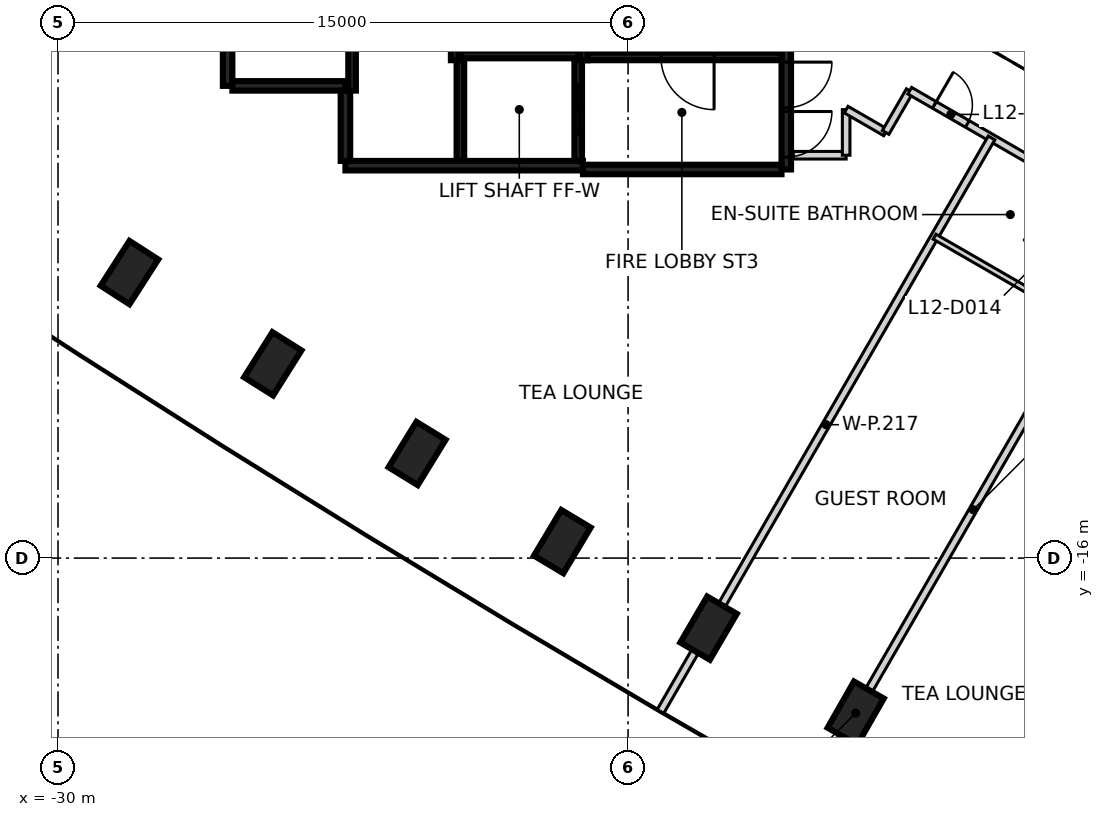
"""IFC4 building model, lengths in metres.
Left out: names, types, materials, properties, quantities, classifications, styles, units other than length and angle.
Written with IfcOpenShell. Run it as: python <this file> out.ifc"""

import sys

from ifc_helpers import new_model, si_unit, direction, frame, frame_2d, origin, origin_2d, place, context, subcontext, project, spatial, rectangle, extrude, element, fill, save


model = new_model("IFC4")
c1 = context("Model", 3, precision=1e-05, world=origin(), true_north=direction((0.0, 1.0)))
c2 = subcontext(c1, "Body", "Model", "MODEL_VIEW")
j1 = project(units=[si_unit("LENGTHUNIT", "METRE"), si_unit("PLANEANGLEUNIT", "RADIAN")], contexts=[c1])
p1 = place(None, origin())
s1 = spatial("IfcSite", under=j1, at=p1, CompositionType="ELEMENT")
p2 = place(p1, origin())
s2 = spatial("IfcBuilding", under=s1, at=p2, CompositionType="ELEMENT")
p3 = place(p2, frame((0.0, 0.0, 56.6)))
s3 = spatial("IfcBuildingStorey", under=s2, at=p3, CompositionType="ELEMENT", Elevation=56.6)
for number, where, z_axis, x_axis in (
    (1, (-28.12, -8.488, -0.475), (0.0, 0.0, 1.0), (0.541, 0.841, 0.0)),
    (2, (-24.349, -10.888, -0.475), (0.0, 0.0, 1.0), (0.532, 0.846, 0.0)),
    (3, (-20.552, -13.248, -0.475), (0.0, 0.0, 1.0), (0.523, 0.852, 0.0)),
    (4, (-16.73, -15.566, -0.475), (0.0, 0.0, 1.0), (0.514, 0.858, 0.0)),
    (5, (-12.883, -17.844, -0.475), (0.0, 0.0, 1.0), (0.505, 0.863, 0.0)),
    (6, (-9.011, -20.079, -0.475), (0.0, 0.0, 1.0), (0.495, 0.869, 0.0)),
):
    element("IfcColumn", number, at=place(p3, frame(where, z_axis=z_axis, x_axis=x_axis)), inside=s3, PredefinedType="COLUMN", context=c2, shape_type="SweptSolid", body=[
        extrude(rectangle(XDim=1.4, YDim=0.9, at=origin_2d()), origin(), (0.0, 0.0, 1.0), 3.6),
    ])
p4 = place(p3, frame((-10.837, 5.775, 0.0), z_axis=(0.0, 0.0, 1.0), x_axis=(0.0, -1.0, 0.0)))
e7 = element("IfcWall", 7, at=p4, inside=s3, PredefinedType="SHEAR", context=c2, shape_type="SweptSolid", body=[
    extrude(rectangle(XDim=11.55, YDim=0.25, at=frame_2d((5.775, 0.0))), origin(), (0.0, 0.0, 1.0), 3.125),
])
p5 = place(p4, frame((10.025, 0.0, 0.0)))
e8 = element("IfcOpeningElement", 8, at=p5, cuts=e7, PredefinedType="OPENING", context=c2, shape_type="SweptSolid", body=[
    extrude(rectangle(XDim=1.2, YDim=2.1, at=frame_2d((0.6, 1.05))), frame((0.0, 0.135, 0.0), z_axis=(0.0, -1.0, 0.0), x_axis=(1.0, 0.0, 0.0)), (0.0, 0.0, 1.0), 0.27),
])
p6 = place(p4, frame((8.725, 0.0, 0.0)))
e9 = element("IfcOpeningElement", 9, at=p6, cuts=e7, PredefinedType="OPENING", context=c2, shape_type="SweptSolid", body=[
    extrude(rectangle(XDim=1.2, YDim=2.1, at=frame_2d((0.6, 1.05))), frame((0.0, 0.135, 0.0), z_axis=(0.0, -1.0, 0.0), x_axis=(1.0, 0.0, 0.0)), (0.0, 0.0, 1.0), 0.27),
])
p7 = place(p3, frame((-16.187, -5.675, 0.0), z_axis=(0.0, 0.0, 1.0), x_axis=(-1.0, 0.0, 0.0)))
e10 = element("IfcWall", 10, at=p7, inside=s3, PredefinedType="SHEAR", context=c2, shape_type="SweptSolid", body=[
    extrude(rectangle(XDim=6.25, YDim=0.25, at=frame_2d((3.125, 0.0))), origin(), (0.0, 0.0, 1.0), 3.125),
])
p8 = place(p3, frame((-25.537, -3.575, 0.0), z_axis=(0.0, 0.0, 1.0), x_axis=(0.0, 1.0, 0.0)))
e11 = element("IfcWall", 11, at=p8, inside=s3, PredefinedType="SHEAR", context=c2, shape_type="SweptSolid", body=[
    extrude(rectangle(XDim=5.85, YDim=0.25, at=frame_2d((2.925, 0.0))), origin(), (0.0, 0.0, 1.0), 3.125),
])
p9 = place(p3, frame((-10.963, -5.775, 0.0), z_axis=(0.0, 0.0, 1.0), x_axis=(-1.0, 0.0, 0.0)))
e12 = element("IfcWall", 12, at=p9, inside=s3, PredefinedType="SHEAR", context=c2, shape_type="SweptSolid", body=[
    extrude(rectangle(XDim=5.225, YDim=0.25, at=frame_2d((2.612, 0.0))), origin(), (0.0, 0.0, 1.0), 3.125),
])
p10 = place(p3, frame((-22.437, -3.575, 0.0), z_axis=(0.0, 0.0, 1.0), x_axis=(-1.0, 0.0, 0.0)))
e13 = element("IfcWall", 13, at=p10, inside=s3, PredefinedType="SHEAR", context=c2, shape_type="SweptSolid", body=[
    extrude(rectangle(XDim=2.975, YDim=0.25, at=frame_2d((1.487, 0.0))), origin(), (0.0, 0.0, 1.0), 3.125),
])
p11 = place(p3, frame((-22.437, -5.55, 0.0), z_axis=(0.0, 0.0, 1.0), x_axis=(0.0, 1.0, 0.0)))
e14 = element("IfcWall", 14, at=p11, inside=s3, PredefinedType="SHEAR", context=c2, shape_type="SweptSolid", body=[
    extrude(rectangle(XDim=1.849, YDim=0.25, at=frame_2d((0.925, 0.0))), origin(), (0.0, 0.0, 1.0), 3.125),
])
p12 = place(p3, frame((-16.162, 2.951, 0.0), z_axis=(0.0, 0.0, 1.0), x_axis=(0.0, -1.0, 0.0)))
e15 = element("IfcWall", 15, at=p12, inside=s3, PredefinedType="SHEAR", context=c2, shape_type="SweptSolid", body=[
    extrude(rectangle(XDim=5.851, YDim=0.2, at=frame_2d((2.925, 0.0))), origin(), (0.0, 0.0, 1.0), 3.125),
])
for number, where, z_axis, x_axis in (
    (16, (-19.562, -2.9, 0.0), (0.0, 0.0, 1.0), (0.0, 1.0, 0.0)),
    (17, (-22.262, 2.4, 0.0), (0.0, 0.0, 1.0), (0.0, -1.0, 0.0)),
):
    element("IfcWall", number, at=place(p3, frame(where, z_axis=z_axis, x_axis=x_axis)), inside=s3, PredefinedType="SHEAR", context=c2, shape_type="SweptSolid", body=[
        extrude(rectangle(XDim=6.1, YDim=0.2, at=frame_2d((3.05, 0.0))), origin(), (0.0, 0.0, 1.0), 3.125),
    ])
p13 = place(p3, frame((-10.963, -2.8, 0.0), z_axis=(0.0, 0.0, 1.0), x_axis=(-1.0, 0.0, 0.0)))
e18 = element("IfcWall", 18, at=p13, inside=s3, PredefinedType="SHEAR", context=c2, shape_type="SweptSolid", body=[
    extrude(rectangle(XDim=5.098, YDim=0.2, at=frame_2d((2.549, 0.0))), origin(), (0.0, 0.0, 1.0), 3.125),
])
p14 = place(p13, frame((1.774, 0.0, 0.0)))
e19 = element("IfcOpeningElement", 19, at=p14, cuts=e18, PredefinedType="OPENING", context=c2, shape_type="SweptSolid", body=[
    extrude(rectangle(XDim=1.4, YDim=2.1, at=frame_2d((0.7, 1.05))), frame((0.0, 0.11, 0.0), z_axis=(0.0, -1.0, 0.0), x_axis=(1.0, 0.0, 0.0)), (0.0, 0.0, 1.0), 0.22),
])
p15 = place(p3, frame((-19.412, -2.75, 0.0), z_axis=(0.0, 0.0, 1.0), x_axis=(1.0, 0.0, 0.0)))
e20 = element("IfcWall", 20, at=p15, inside=s3, PredefinedType="SHEAR", context=c2, shape_type="SweptSolid", body=[
    extrude(rectangle(XDim=3.1, YDim=0.2, at=frame_2d((1.55, 0.0))), origin(), (0.0, 0.0, 1.0), 3.125),
])
p16 = place(p3, frame((-16.312, -2.898, 0.0), z_axis=(0.0, 0.0, 1.0), x_axis=(0.0, -1.0, 0.0)))
e21 = element("IfcWall", 21, at=p16, inside=s3, PredefinedType="SHEAR", context=c2, shape_type="SweptSolid", body=[
    extrude(rectangle(XDim=2.651, YDim=0.2, at=frame_2d((1.325, 0.0))), origin(), (0.0, 0.0, 1.0), 3.125),
])
p17 = place(p16, frame((0.652, 0.0, 0.0)))
e22 = element("IfcOpeningElement", 22, at=p17, cuts=e21, PredefinedType="OPENING", context=c2, shape_type="SweptSolid", body=[
    extrude(rectangle(XDim=1.3, YDim=2.1, at=frame_2d((0.65, 1.05))), frame((0.0, 0.11, 0.0), z_axis=(0.0, -1.0, 0.0), x_axis=(1.0, 0.0, 0.0)), (0.0, 0.0, 1.0), 0.22),
])
p18 = place(p3, frame((-19.412, -5.549, 0.0), z_axis=(0.0, 0.0, 1.0), x_axis=(0.0, 1.0, 0.0)))
e23 = element("IfcWall", 23, at=p18, inside=s3, PredefinedType="SHEAR", context=c2, shape_type="SweptSolid", body=[
    extrude(rectangle(XDim=2.651, YDim=0.2, at=frame_2d((1.325, 0.0))), origin(), (0.0, 0.0, 1.0), 3.125),
])
p19 = place(p3, frame((-10.652, -5.4, 0.0), z_axis=(0.0, 0.0, 1.0), x_axis=(1.0, 0.0, 0.0)))
e24 = element("IfcWall", 24, at=p19, inside=s3, PredefinedType="PARTITIONING", context=c2, shape_type="SweptSolid", body=[
    extrude(rectangle(XDim=1.39, YDim=0.2, at=frame_2d((0.695, 0.0))), origin(), (0.0, 0.0, 1.0), 3.125),
])
for number, where, z_axis, x_axis in (
    (25, (-9.262, -5.4, 0.0), (0.0, 0.0, 1.0), (0.0, 1.0, 0.0)),
    (26, (-9.262, -4.2, 0.0), (0.0, 0.0, 1.0), (0.866, -0.5, 0.0)),
):
    element("IfcWall", number, at=place(p3, frame(where, z_axis=z_axis, x_axis=x_axis)), inside=s3, PredefinedType="PARTITIONING", context=c2, shape_type="SweptSolid", body=[
        extrude(rectangle(XDim=1.2, YDim=0.2, at=frame_2d((0.6, 0.0))), origin(), (0.0, 0.0, 1.0), 3.125),
    ])
p20 = place(p3, frame((-8.223, -4.8, 0.0), z_axis=(0.0, 0.0, 1.0), x_axis=(0.499866914522, 0.866102227088, 0.0)))
e27 = element("IfcWall", 27, at=p20, inside=s3, PredefinedType="PARTITIONING", context=c2, shape_type="SweptSolid", body=[
    extrude(rectangle(XDim=1.268, YDim=0.2, at=frame_2d((0.634, 0.0))), origin(), (0.0, 0.0, 1.0), 3.125),
])
p21 = place(p3, frame((-7.589, -3.702, 0.0), z_axis=(0.0, 0.0, 1.0), x_axis=(0.865995139556, -0.500052415518, 0.0)))
e28 = element("IfcWall", 28, at=p21, inside=s3, PredefinedType="PARTITIONING", context=c2, shape_type="SweptSolid", body=[
    extrude(rectangle(XDim=8.689, YDim=0.2, at=frame_2d((4.344, 0.0))), origin(), (0.0, 0.0, 1.0), 3.125),
])
p22 = place(p21, frame((0.749, 0.0, 0.0)))
e29 = element("IfcOpeningElement", 29, at=p22, cuts=e28, PredefinedType="OPENING", context=c2, shape_type="SweptSolid", body=[
    extrude(rectangle(XDim=1.0, YDim=2.1, at=frame_2d((0.5, 1.05))), frame((0.0, 0.11, 0.0), z_axis=(0.0, -1.0, 0.0), x_axis=(1.0, 0.0, 0.0)), (0.0, 0.0, 1.0), 0.22),
])
p23 = place(p21, frame((5.819, 0.0, 0.0)))
e30 = element("IfcOpeningElement", 30, at=p23, cuts=e28, PredefinedType="OPENING", context=c2, shape_type="SweptSolid", body=[
    extrude(rectangle(XDim=0.95, YDim=2.1, at=frame_2d((0.475, 1.05))), frame((0.0, 0.11, 0.0), z_axis=(0.0, -1.0, 0.0), x_axis=(1.0, 0.0, 0.0)), (0.0, 0.0, 1.0), 0.22),
])
p24 = place(p3, frame((-14.148, -20.035, 0.0), z_axis=(0.0, 0.0, 1.0), x_axis=(0.500005855417, 0.866022023131, 0.0)))
e31 = element("IfcWall", 31, at=p24, inside=s3, PredefinedType="PARTITIONING", context=c2, shape_type="SweptSolid", body=[
    extrude(rectangle(XDim=17.425, YDim=0.2, at=frame_2d((8.712, 0.0))), origin(), (0.0, 0.0, 1.0), 3.125),
])
p25 = place(p3, frame((-10.276, -22.271, 0.0), z_axis=(0.0, 0.0, 1.0), x_axis=(0.49999372146, 0.866029028671, 0.0)))
e32 = element("IfcWall", 32, at=p25, inside=s3, PredefinedType="PARTITIONING", context=c2, shape_type="SweptSolid", body=[
    extrude(rectangle(XDim=17.425, YDim=0.2, at=frame_2d((8.712, 0.0))), origin(), (0.0, 0.0, 1.0), 3.125),
])
p26 = place(p3, frame((-6.381, -24.464, 0.0), z_axis=(0.0, 0.0, 1.0), x_axis=(0.500007577232, 0.866021029023, 0.0)))
e33 = element("IfcWall", 33, at=p26, inside=s3, PredefinedType="PARTITIONING", context=c2, shape_type="SweptSolid", body=[
    extrude(rectangle(XDim=9.883, YDim=0.2, at=frame_2d((4.941, 0.0))), origin(), (0.0, 0.0, 1.0), 3.125),
])
p27 = place(p3, frame((-6.936, -7.543, 0.0), z_axis=(0.0, 0.0, 1.0), x_axis=(0.866153027342, -0.499778884334, 0.0)))
e34 = element("IfcWall", 34, at=p27, inside=s3, PredefinedType="PARTITIONING", context=c2, shape_type="SweptSolid", body=[
    extrude(rectangle(XDim=2.871, YDim=0.15, at=frame_2d((1.436, 0.0))), origin(), (0.0, 0.0, 1.0), 3.125),
])
p28 = place(p17, origin())
e35 = element("IfcDoor", 35, at=p28, inside=s3, OperationType="SLIDING_TO_RIGHT", PredefinedType="DOOR", context=c2, shape_type="SweptSolid", body=[
    extrude(rectangle(XDim=1.3, YDim=2.1, at=frame_2d((0.65, 1.05))), frame((0.0, 0.025, 0.0), z_axis=(0.0, -1.0, 0.0), x_axis=(1.0, 0.0, 0.0)), (0.0, 0.0, 1.0), 0.05),
])
fill(e22, e35)
p29 = place(p5, origin())
e36 = element("IfcDoor", 36, at=p29, inside=s3, OperationType="SINGLE_SWING_LEFT", PredefinedType="DOOR", context=c2, shape_type="SweptSolid", body=[
    extrude(rectangle(XDim=1.2, YDim=2.1, at=frame_2d((0.6, 1.05))), frame((0.0, 0.025, 0.0), z_axis=(0.0, -1.0, 0.0), x_axis=(1.0, 0.0, 0.0)), (0.0, 0.0, 1.0), 0.05),
])
fill(e8, e36)
p30 = place(p6, origin())
e37 = element("IfcDoor", 37, at=p30, inside=s3, OperationType="SINGLE_SWING_RIGHT", PredefinedType="DOOR", context=c2, shape_type="SweptSolid", body=[
    extrude(rectangle(XDim=1.2, YDim=2.1, at=frame_2d((0.6, 1.05))), frame((0.0, 0.025, 0.0), z_axis=(0.0, -1.0, 0.0), x_axis=(1.0, 0.0, 0.0)), (0.0, 0.0, 1.0), 0.05),
])
fill(e9, e37)
p31 = place(p14, origin())
e38 = element("IfcDoor", 38, at=p31, inside=s3, OperationType="SINGLE_SWING_RIGHT", PredefinedType="DOOR", context=c2, shape_type="SweptSolid", body=[
    extrude(rectangle(XDim=1.4, YDim=2.1, at=frame_2d((0.7, 1.05))), frame((0.0, 0.025, 0.0), z_axis=(0.0, -1.0, 0.0), x_axis=(1.0, 0.0, 0.0)), (0.0, 0.0, 1.0), 0.05),
])
fill(e19, e38)
p32 = place(p22, frame((1.0, 0.0, 0.0), z_axis=(0.0, 0.0, 1.0), x_axis=(-1.0, 0.0, 0.0)))
e39 = element("IfcDoor", 39, at=p32, inside=s3, OperationType="SINGLE_SWING_LEFT", PredefinedType="DOOR", context=c2, shape_type="SweptSolid", body=[
    extrude(rectangle(XDim=1.0, YDim=2.1, at=frame_2d((0.5, 1.05))), frame((0.0, 0.025, 0.0), z_axis=(0.0, -1.0, 0.0), x_axis=(1.0, 0.0, 0.0)), (0.0, 0.0, 1.0), 0.05),
])
fill(e29, e39)
save(model, sys.argv[1])
